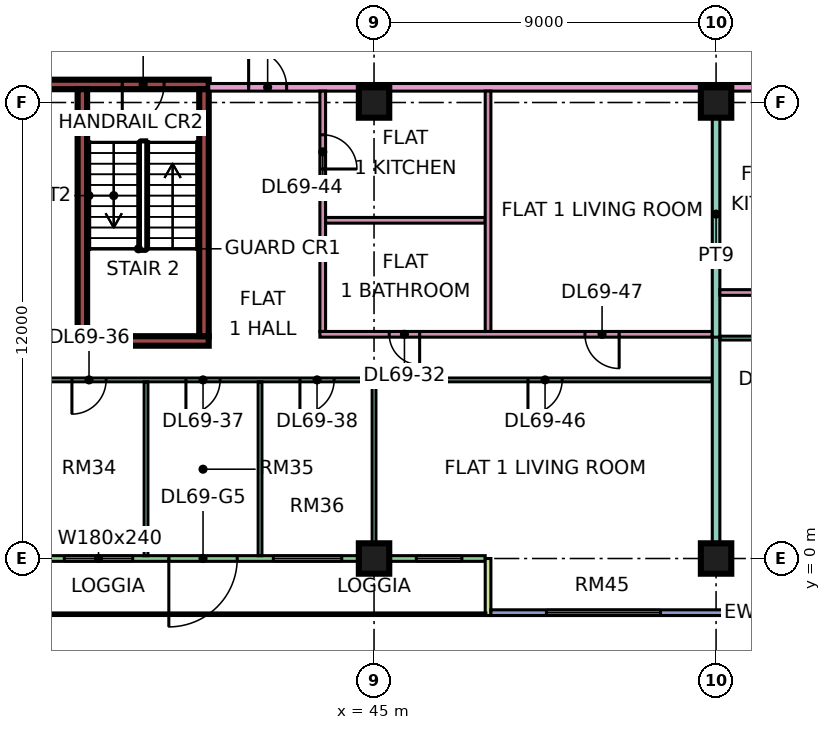
"""IFC4 building model, lengths in metres.
Left out: names, types, materials, properties, quantities, classifications, styles, units other than length and angle.
Written with IfcOpenShell. Run it as: python <this file> out.ifc"""

import sys

from ifc_helpers import new_model, si_unit, direction, frame, frame_2d, origin, origin_2d, place, context, subcontext, project, spatial, rectangle, extrude, element, fill, save


model = new_model("IFC4")
c1 = context("Model", 3, precision=1e-05, world=origin(), true_north=direction((0.0, 1.0)))
c2 = subcontext(c1, "Body", "Model", "MODEL_VIEW")
j1 = project(units=[si_unit("LENGTHUNIT", "METRE"), si_unit("PLANEANGLEUNIT", "RADIAN")], contexts=[c1])
p1 = place(None, origin())
s1 = spatial("IfcSite", under=j1, at=p1, CompositionType="ELEMENT")
p2 = place(p1, origin())
s2 = spatial("IfcBuilding", under=s1, at=p2, CompositionType="ELEMENT")
p3 = place(p2, frame((0.0, 0.0, 295.9)))
s3 = spatial("IfcBuildingStorey", under=s2, at=p3, CompositionType="ELEMENT", Elevation=295.9)
for number, where, z_axis, x_axis in (
    (1, (45.0, 0.0, 0.0), (0.0, 0.0, 1.0), (1.0, 0.0, 0.0)),
    (2, (45.0, 12.0, 0.0), (0.0, 0.0, 1.0), (1.0, 0.0, 0.0)),
    (3, (54.0, 0.0, 0.0), (0.0, 0.0, 1.0), (1.0, 0.0, 0.0)),
    (4, (54.0, 12.0, 0.0), (0.0, 0.0, 1.0), (1.0, 0.0, 0.0)),
):
    element("IfcColumn", number, at=place(p3, frame(where, z_axis=z_axis, x_axis=x_axis)), inside=s3, PredefinedType="COLUMN", context=c2, shape_type="SweptSolid", body=[
        extrude(rectangle(XDim=0.8, YDim=0.8, at=origin_2d()), origin(), (0.0, 0.0, 1.0), 3.75),
    ])
p4 = place(p3, frame((37.2, 5.725, 0.0), z_axis=(0.0, 0.0, 1.0), x_axis=(1.0, 0.0, 0.0)))
e5 = element("IfcWall", 5, at=p4, inside=s3, PredefinedType="SHEAR", context=c2, shape_type="SweptSolid", body=[
    extrude(rectangle(XDim=3.45, YDim=0.25, at=frame_2d((1.725, 0.0))), origin(), (0.0, 0.0, 1.0), 3.75),
])
p5 = place(p3, frame((36.4, 12.475, 0.0), z_axis=(0.0, 0.0, 1.0), x_axis=(1.0, 0.0, 0.0)))
e6 = element("IfcWall", 6, at=p5, inside=s3, PredefinedType="SHEAR", context=c2, shape_type="SweptSolid", body=[
    extrude(rectangle(XDim=4.25, YDim=0.25, at=frame_2d((2.125, 0.0))), origin(), (0.0, 0.0, 1.0), 3.75),
])
p6 = place(p5, frame((1.975, 0.0, 0.0)))
e7 = element("IfcOpeningElement", 7, at=p6, cuts=e6, PredefinedType="OPENING", context=c2, shape_type="SweptSolid", body=[
    extrude(rectangle(XDim=1.1, YDim=2.2, at=frame_2d((0.55, 1.1))), frame((0.0, 0.135, 0.0), z_axis=(0.0, -1.0, 0.0), x_axis=(1.0, 0.0, 0.0)), (0.0, 0.0, 1.0), 0.27),
])
for number, where, z_axis, x_axis in (
    (8, (37.325, 5.85, 0.0), (0.0, 0.0, 1.0), (0.0, 1.0, 0.0)),
    (9, (40.525, 5.85, 0.0), (0.0, 0.0, 1.0), (0.0, 1.0, 0.0)),
):
    element("IfcWall", number, at=place(p3, frame(where, z_axis=z_axis, x_axis=x_axis)), inside=s3, PredefinedType="SHEAR", context=c2, shape_type="SweptSolid", body=[
        extrude(rectangle(XDim=6.5, YDim=0.25, at=frame_2d((3.25, 0.0))), origin(), (0.0, 0.0, 1.0), 3.75),
    ])
p7 = place(p3, frame((36.075, 0.0, 0.0), z_axis=(0.0, 0.0, 1.0), x_axis=(1.0, 0.0, 0.0)))
e10 = element("IfcWall", 10, at=p7, inside=s3, PredefinedType="SOLIDWALL", context=c2, shape_type="SweptSolid", body=[
    extrude(rectangle(XDim=11.85, YDim=0.15, at=frame_2d((5.925, 0.0))), origin(), (0.0, 0.0, 1.0), 3.35),
])
p8 = place(p7, frame((0.775, 0.0, 0.45)))
e11 = element("IfcOpeningElement", 11, at=p8, cuts=e10, PredefinedType="OPENING", context=c2, shape_type="SweptSolid", body=[
    extrude(rectangle(XDim=1.8, YDim=2.4, at=frame_2d((0.9, 1.2))), frame((0.0, 0.085, 0.0), z_axis=(0.0, -1.0, 0.0), x_axis=(1.0, 0.0, 0.0)), (0.0, 0.0, 1.0), 0.17),
])
p9 = place(p7, frame((3.525, 0.0, 0.0)))
e12 = element("IfcOpeningElement", 12, at=p9, cuts=e10, PredefinedType="OPENING", context=c2, shape_type="SweptSolid", body=[
    extrude(rectangle(XDim=1.8, YDim=2.4, at=frame_2d((0.9, 1.2))), frame((0.0, 0.085, 0.0), z_axis=(0.0, -1.0, 0.0), x_axis=(1.0, 0.0, 0.0)), (0.0, 0.0, 1.0), 0.17),
])
p10 = place(p7, frame((6.275, 0.0, 0.45)))
e13 = element("IfcOpeningElement", 13, at=p10, cuts=e10, PredefinedType="OPENING", context=c2, shape_type="SweptSolid", body=[
    extrude(rectangle(XDim=1.8, YDim=2.4, at=frame_2d((0.9, 1.2))), frame((0.0, 0.085, 0.0), z_axis=(0.0, -1.0, 0.0), x_axis=(1.0, 0.0, 0.0)), (0.0, 0.0, 1.0), 0.17),
])
p11 = place(p7, frame((10.038, 0.0, 0.45)))
e14 = element("IfcOpeningElement", 14, at=p11, cuts=e10, PredefinedType="OPENING", context=c2, shape_type="SweptSolid", body=[
    extrude(rectangle(XDim=1.2, YDim=2.4, at=frame_2d((0.6, 1.2))), frame((0.0, 0.085, 0.0), z_axis=(0.0, -1.0, 0.0), x_axis=(1.0, 0.0, 0.0)), (0.0, 0.0, 1.0), 0.17),
])
p12 = place(p3, frame((48.0, -1.5, 0.0), z_axis=(0.0, 0.0, 1.0), x_axis=(0.0, 1.0, 0.0)))
e15 = element("IfcWall", 15, at=p12, inside=s3, PredefinedType="SOLIDWALL", context=c2, shape_type="SweptSolid", body=[
    extrude(rectangle(XDim=1.5, YDim=0.15, at=frame_2d((0.75, 0.0))), origin(), (0.0, 0.0, 1.0), 3.35),
])
p13 = place(p3, frame((48.075, -1.425, 0.0), z_axis=(0.0, 0.0, 1.0), x_axis=(1.0, 0.0, 0.0)))
e16 = element("IfcWall", 16, at=p13, inside=s3, PredefinedType="SOLIDWALL", context=c2, shape_type="SweptSolid", body=[
    extrude(rectangle(XDim=13.425, YDim=0.15, at=frame_2d((6.712, 0.0))), origin(), (0.0, 0.0, 1.0), 3.35),
])
p14 = place(p13, frame((1.462, 0.0, 0.45)))
e17 = element("IfcOpeningElement", 17, at=p14, cuts=e16, PredefinedType="OPENING", context=c2, shape_type="SweptSolid", body=[
    extrude(rectangle(XDim=3.0, YDim=2.4, at=frame_2d((1.5, 1.2))), frame((0.0, 0.085, 0.0), z_axis=(0.0, -1.0, 0.0), x_axis=(1.0, 0.0, 0.0)), (0.0, 0.0, 1.0), 0.17),
])
p15 = place(p13, frame((6.525, 0.0, 0.45)))
e18 = element("IfcOpeningElement", 18, at=p15, cuts=e16, PredefinedType="OPENING", context=c2, shape_type="SweptSolid", body=[
    extrude(rectangle(XDim=1.8, YDim=2.4, at=frame_2d((0.9, 1.2))), frame((0.0, 0.085, 0.0), z_axis=(0.0, -1.0, 0.0), x_axis=(1.0, 0.0, 0.0)), (0.0, 0.0, 1.0), 0.17),
])
p16 = place(p13, frame((9.675, 0.0, 0.45)))
e19 = element("IfcOpeningElement", 19, at=p16, cuts=e16, PredefinedType="OPENING", context=c2, shape_type="SweptSolid", body=[
    extrude(rectangle(XDim=3.0, YDim=2.4, at=frame_2d((1.5, 1.2))), frame((0.0, 0.085, 0.0), z_axis=(0.0, -1.0, 0.0), x_axis=(1.0, 0.0, 0.0)), (0.0, 0.0, 1.0), 0.17),
])
p17 = place(p3, frame((33.05, 4.7, 0.0), z_axis=(0.0, 0.0, 1.0), x_axis=(1.0, 0.0, 0.0)))
e20 = element("IfcWall", 20, at=p17, inside=s3, PredefinedType="PARTITIONING", context=c2, shape_type="SweptSolid", body=[
    extrude(rectangle(XDim=20.85, YDim=0.1, at=frame_2d((10.425, 0.0))), origin(), (0.0, 0.0, 1.0), 3.35),
])
p18 = place(p17, frame((1.0, 0.0, 0.0)))
e21 = element("IfcOpeningElement", 21, at=p18, cuts=e20, PredefinedType="OPENING", context=c2, shape_type="SweptSolid", body=[
    extrude(rectangle(XDim=0.9, YDim=2.1, at=frame_2d((0.45, 1.05))), frame((0.0, 0.06, 0.0), z_axis=(0.0, -1.0, 0.0), x_axis=(1.0, 0.0, 0.0)), (0.0, 0.0, 1.0), 0.12),
])
p19 = place(p17, frame((4.0, 0.0, 0.0)))
e22 = element("IfcOpeningElement", 22, at=p19, cuts=e20, PredefinedType="OPENING", context=c2, shape_type="SweptSolid", body=[
    extrude(rectangle(XDim=0.9, YDim=2.1, at=frame_2d((0.45, 1.05))), frame((0.0, 0.06, 0.0), z_axis=(0.0, -1.0, 0.0), x_axis=(1.0, 0.0, 0.0)), (0.0, 0.0, 1.0), 0.12),
])
p20 = place(p17, frame((7.0, 0.0, 0.0)))
e23 = element("IfcOpeningElement", 23, at=p20, cuts=e20, PredefinedType="OPENING", context=c2, shape_type="SweptSolid", body=[
    extrude(rectangle(XDim=0.9, YDim=2.1, at=frame_2d((0.45, 1.05))), frame((0.0, 0.06, 0.0), z_axis=(0.0, -1.0, 0.0), x_axis=(1.0, 0.0, 0.0)), (0.0, 0.0, 1.0), 0.12),
])
p21 = place(p17, frame((10.0, 0.0, 0.0)))
e24 = element("IfcOpeningElement", 24, at=p21, cuts=e20, PredefinedType="OPENING", context=c2, shape_type="SweptSolid", body=[
    extrude(rectangle(XDim=0.9, YDim=2.1, at=frame_2d((0.45, 1.05))), frame((0.0, 0.06, 0.0), z_axis=(0.0, -1.0, 0.0), x_axis=(1.0, 0.0, 0.0)), (0.0, 0.0, 1.0), 0.12),
])
p22 = place(p17, frame((16.0, 0.0, 0.0)))
e25 = element("IfcOpeningElement", 25, at=p22, cuts=e20, PredefinedType="OPENING", context=c2, shape_type="SweptSolid", body=[
    extrude(rectangle(XDim=0.9, YDim=2.1, at=frame_2d((0.45, 1.05))), frame((0.0, 0.06, 0.0), z_axis=(0.0, -1.0, 0.0), x_axis=(1.0, 0.0, 0.0)), (0.0, 0.0, 1.0), 0.12),
])
p23 = place(p3, frame((39.0, 0.074, 0.0), z_axis=(0.0, 0.0, 1.0), x_axis=(0.0, 1.0, 0.0)))
e26 = element("IfcWall", 26, at=p23, inside=s3, PredefinedType="PARTITIONING", context=c2, shape_type="SweptSolid", body=[
    extrude(rectangle(XDim=4.576, YDim=0.1, at=frame_2d((2.288, 0.0))), origin(), (0.0, 0.0, 1.0), 3.35),
])
p24 = place(p3, frame((40.65, 12.4, 0.0), z_axis=(0.0, 0.0, 1.0), x_axis=(1.0, 0.0, 0.0)))
e27 = element("IfcWall", 27, at=p24, inside=s3, PredefinedType="PARTITIONING", context=c2, shape_type="SweptSolid", body=[
    extrude(rectangle(XDim=22.276, YDim=0.2, at=frame_2d((11.138, 0.0))), origin(), (0.0, 0.0, 1.0), 3.35),
])
p25 = place(p24, frame((20.25, 0.0, 0.0)))
e28 = element("IfcOpeningElement", 28, at=p25, cuts=e27, PredefinedType="OPENING", context=c2, shape_type="SweptSolid", body=[
    extrude(rectangle(XDim=1.0, YDim=2.1, at=frame_2d((0.5, 1.05))), frame((0.0, 0.11, 0.0), z_axis=(0.0, -1.0, 0.0), x_axis=(1.0, 0.0, 0.0)), (0.0, 0.0, 1.0), 0.22),
])
p26 = place(p24, frame((1.05, 0.0, 0.0)))
e29 = element("IfcOpeningElement", 29, at=p26, cuts=e27, PredefinedType="OPENING", context=c2, shape_type="SweptSolid", body=[
    extrude(rectangle(XDim=1.0, YDim=2.1, at=frame_2d((0.5, 1.05))), frame((0.0, 0.11, 0.0), z_axis=(0.0, -1.0, 0.0), x_axis=(1.0, 0.0, 0.0)), (0.0, 0.0, 1.0), 0.22),
])
p27 = place(p3, frame((42.0, 0.074, 0.0), z_axis=(0.0, 0.0, 1.0), x_axis=(0.0, 1.0, 0.0)))
e30 = element("IfcWall", 30, at=p27, inside=s3, PredefinedType="PARTITIONING", context=c2, shape_type="SweptSolid", body=[
    extrude(rectangle(XDim=4.576, YDim=0.1, at=frame_2d((2.288, 0.0))), origin(), (0.0, 0.0, 1.0), 3.35),
])
p28 = place(p3, frame((43.575, 5.9, 0.0), z_axis=(0.0, 0.0, 1.0), x_axis=(1.0, 0.0, 0.0)))
e31 = element("IfcWall", 31, at=p28, inside=s3, PredefinedType="PARTITIONING", context=c2, shape_type="SweptSolid", body=[
    extrude(rectangle(XDim=10.325, YDim=0.15, at=frame_2d((5.163, 0.0))), origin(), (0.0, 0.0, 1.0), 3.35),
])
p29 = place(p28, frame((1.825, 0.0, 0.0)))
e32 = element("IfcOpeningElement", 32, at=p29, cuts=e31, PredefinedType="OPENING", context=c2, shape_type="SweptSolid", body=[
    extrude(rectangle(XDim=0.8, YDim=2.1, at=frame_2d((0.4, 1.05))), frame((0.0, 0.085, 0.0), z_axis=(0.0, -1.0, 0.0), x_axis=(1.0, 0.0, 0.0)), (0.0, 0.0, 1.0), 0.17),
])
p30 = place(p28, frame((6.975, 0.0, 0.0)))
e33 = element("IfcOpeningElement", 33, at=p30, cuts=e31, PredefinedType="OPENING", context=c2, shape_type="SweptSolid", body=[
    extrude(rectangle(XDim=0.9, YDim=2.1, at=frame_2d((0.45, 1.05))), frame((0.0, 0.085, 0.0), z_axis=(0.0, -1.0, 0.0), x_axis=(1.0, 0.0, 0.0)), (0.0, 0.0, 1.0), 0.17),
])
p31 = place(p3, frame((43.65, 5.975, 0.0), z_axis=(0.0, 0.0, 1.0), x_axis=(0.0, 1.0, 0.0)))
e34 = element("IfcWall", 34, at=p31, inside=s3, PredefinedType="PARTITIONING", context=c2, shape_type="SweptSolid", body=[
    extrude(rectangle(XDim=6.325, YDim=0.15, at=frame_2d((3.163, 0.0))), origin(), (0.0, 0.0, 1.0), 3.35),
])
p32 = place(p31, frame((4.275, 0.0, 0.0)))
e35 = element("IfcOpeningElement", 35, at=p32, cuts=e34, PredefinedType="OPENING", context=c2, shape_type="SweptSolid", body=[
    extrude(rectangle(XDim=0.9, YDim=2.1, at=frame_2d((0.45, 1.05))), frame((0.0, 0.085, 0.0), z_axis=(0.0, -1.0, 0.0), x_axis=(1.0, 0.0, 0.0)), (0.0, 0.0, 1.0), 0.17),
])
p33 = place(p3, frame((43.725, 8.9, 0.0), z_axis=(0.0, 0.0, 1.0), x_axis=(1.0, 0.0, 0.0)))
e36 = element("IfcWall", 36, at=p33, inside=s3, PredefinedType="PARTITIONING", context=c2, shape_type="SweptSolid", body=[
    extrude(rectangle(XDim=4.2, YDim=0.15, at=frame_2d((2.1, 0.0))), origin(), (0.0, 0.0, 1.0), 3.35),
])
p34 = place(p3, frame((45.0, 0.074, 0.0), z_axis=(0.0, 0.0, 1.0), x_axis=(0.0, 1.0, 0.0)))
e37 = element("IfcWall", 37, at=p34, inside=s3, PredefinedType="PARTITIONING", context=c2, shape_type="SweptSolid", body=[
    extrude(rectangle(XDim=4.576, YDim=0.1, at=frame_2d((2.288, 0.0))), origin(), (0.0, 0.0, 1.0), 3.35),
])
p35 = place(p3, frame((48.0, 5.975, 0.0), z_axis=(0.0, 0.0, 1.0), x_axis=(0.0, 1.0, 0.0)))
e38 = element("IfcWall", 38, at=p35, inside=s3, PredefinedType="PARTITIONING", context=c2, shape_type="SweptSolid", body=[
    extrude(rectangle(XDim=6.325, YDim=0.15, at=frame_2d((3.163, 0.0))), origin(), (0.0, 0.0, 1.0), 3.35),
])
p36 = place(p3, frame((54.0, 0.0, 0.0), z_axis=(0.0, 0.0, 1.0), x_axis=(0.0, 1.0, 0.0)))
e39 = element("IfcWall", 39, at=p36, inside=s3, PredefinedType="PARTITIONING", context=c2, shape_type="SweptSolid", body=[
    extrude(rectangle(XDim=5.85, YDim=0.2, at=frame_2d((2.925, 0.0))), origin(), (0.0, 0.0, 1.0), 3.35),
])
p37 = place(p3, frame((54.0, 5.825, 0.0), z_axis=(0.0, 0.0, 1.0), x_axis=(0.0, 1.0, 0.0)))
e40 = element("IfcWall", 40, at=p37, inside=s3, PredefinedType="PARTITIONING", context=c2, shape_type="SweptSolid", body=[
    extrude(rectangle(XDim=6.475, YDim=0.2, at=frame_2d((3.238, 0.0))), origin(), (0.0, 0.0, 1.0), 3.35),
])
p38 = place(p3, frame((54.1, 5.8, 0.0), z_axis=(0.0, 0.0, 1.0), x_axis=(1.0, 0.0, 0.0)))
e41 = element("IfcWall", 41, at=p38, inside=s3, PredefinedType="PARTITIONING", context=c2, shape_type="SweptSolid", body=[
    extrude(rectangle(XDim=2.85, YDim=0.1, at=frame_2d((1.425, 0.0))), origin(), (0.0, 0.0, 1.0), 3.35),
])
p39 = place(p38, frame((0.95, 0.0, 0.0)))
e42 = element("IfcOpeningElement", 42, at=p39, cuts=e41, PredefinedType="OPENING", context=c2, shape_type="SweptSolid", body=[
    extrude(rectangle(XDim=0.9, YDim=2.1, at=frame_2d((0.45, 1.05))), frame((0.0, 0.06, 0.0), z_axis=(0.0, -1.0, 0.0), x_axis=(1.0, 0.0, 0.0)), (0.0, 0.0, 1.0), 0.12),
])
p40 = place(p3, frame((54.1, 7.0, 0.0), z_axis=(0.0, 0.0, 1.0), x_axis=(1.0, 0.0, 0.0)))
e43 = element("IfcWall", 43, at=p40, inside=s3, PredefinedType="PARTITIONING", context=c2, shape_type="SweptSolid", body=[
    extrude(rectangle(XDim=5.675, YDim=0.15, at=frame_2d((2.837, 0.0))), origin(), (0.0, 0.0, 1.0), 3.35),
])
p41 = place(p40, frame((0.95, 0.0, 0.0)))
e44 = element("IfcOpeningElement", 44, at=p41, cuts=e43, PredefinedType="OPENING", context=c2, shape_type="SweptSolid", body=[
    extrude(rectangle(XDim=0.9, YDim=2.1, at=frame_2d((0.45, 1.05))), frame((0.0, 0.085, 0.0), z_axis=(0.0, -1.0, 0.0), x_axis=(1.0, 0.0, 0.0)), (0.0, 0.0, 1.0), 0.17),
])
p42 = place(p8, origin())
e45 = element("IfcWindow", 45, at=p42, inside=s3, PartitioningType="SINGLE_PANEL", PredefinedType="WINDOW", context=c2, shape_type="SweptSolid", body=[
    extrude(rectangle(XDim=1.8, YDim=2.4, at=frame_2d((0.9, 1.2))), frame((0.0, 0.03, 0.0), z_axis=(0.0, -1.0, 0.0), x_axis=(1.0, 0.0, 0.0)), (0.0, 0.0, 1.0), 0.06),
])
fill(e11, e45)
p43 = place(p9, frame((1.8, 0.0, 0.0), z_axis=(0.0, 0.0, 1.0), x_axis=(-1.0, 0.0, 0.0)))
e46 = element("IfcDoor", 46, at=p43, inside=s3, OperationType="DOUBLE_DOOR_SINGLE_SWING", PredefinedType="DOOR", context=c2, shape_type="SweptSolid", body=[
    extrude(rectangle(XDim=1.8, YDim=2.4, at=frame_2d((0.9, 1.2))), frame((0.0, 0.025, 0.0), z_axis=(0.0, -1.0, 0.0), x_axis=(1.0, 0.0, 0.0)), (0.0, 0.0, 1.0), 0.05),
])
fill(e12, e46)
p44 = place(p10, origin())
e47 = element("IfcWindow", 47, at=p44, inside=s3, PartitioningType="SINGLE_PANEL", PredefinedType="WINDOW", context=c2, shape_type="SweptSolid", body=[
    extrude(rectangle(XDim=1.8, YDim=2.4, at=frame_2d((0.9, 1.2))), frame((0.0, 0.03, 0.0), z_axis=(0.0, -1.0, 0.0), x_axis=(1.0, 0.0, 0.0)), (0.0, 0.0, 1.0), 0.06),
])
fill(e13, e47)
p45 = place(p11, origin())
e48 = element("IfcWindow", 48, at=p45, inside=s3, PartitioningType="SINGLE_PANEL", PredefinedType="WINDOW", context=c2, shape_type="SweptSolid", body=[
    extrude(rectangle(XDim=1.2, YDim=2.4, at=frame_2d((0.6, 1.2))), frame((0.0, 0.03, 0.0), z_axis=(0.0, -1.0, 0.0), x_axis=(1.0, 0.0, 0.0)), (0.0, 0.0, 1.0), 0.06),
])
fill(e14, e48)
p46 = place(p14, origin())
e49 = element("IfcWindow", 49, at=p46, inside=s3, PartitioningType="SINGLE_PANEL", PredefinedType="WINDOW", context=c2, shape_type="SweptSolid", body=[
    extrude(rectangle(XDim=3.0, YDim=2.4, at=frame_2d((1.5, 1.2))), frame((0.0, 0.03, 0.0), z_axis=(0.0, -1.0, 0.0), x_axis=(1.0, 0.0, 0.0)), (0.0, 0.0, 1.0), 0.06),
])
fill(e17, e49)
p47 = place(p15, origin())
e50 = element("IfcWindow", 50, at=p47, inside=s3, PartitioningType="SINGLE_PANEL", PredefinedType="WINDOW", context=c2, shape_type="SweptSolid", body=[
    extrude(rectangle(XDim=1.8, YDim=2.4, at=frame_2d((0.9, 1.2))), frame((0.0, 0.03, 0.0), z_axis=(0.0, -1.0, 0.0), x_axis=(1.0, 0.0, 0.0)), (0.0, 0.0, 1.0), 0.06),
])
fill(e18, e50)
p48 = place(p6, frame((1.1, 0.0, 0.0), z_axis=(0.0, 0.0, 1.0), x_axis=(-1.0, 0.0, 0.0)))
e51 = element("IfcDoor", 51, at=p48, inside=s3, OperationType="SINGLE_SWING_LEFT", PredefinedType="DOOR", context=c2, shape_type="SweptSolid", body=[
    extrude(rectangle(XDim=1.1, YDim=2.2, at=frame_2d((0.55, 1.1))), frame((0.0, 0.025, 0.0), z_axis=(0.0, -1.0, 0.0), x_axis=(1.0, 0.0, 0.0)), (0.0, 0.0, 1.0), 0.05),
])
fill(e7, e51)
p49 = place(p29, origin())
e52 = element("IfcDoor", 52, at=p49, inside=s3, OperationType="SINGLE_SWING_RIGHT", PredefinedType="DOOR", context=c2, shape_type="SweptSolid", body=[
    extrude(rectangle(XDim=0.8, YDim=2.1, at=frame_2d((0.4, 1.05))), frame((0.0, 0.025, 0.0), z_axis=(0.0, -1.0, 0.0), x_axis=(1.0, 0.0, 0.0)), (0.0, 0.0, 1.0), 0.05),
])
fill(e32, e52)
p50 = place(p19, frame((0.9, 0.0, 0.0), z_axis=(0.0, 0.0, 1.0), x_axis=(-1.0, 0.0, 0.0)))
e53 = element("IfcDoor", 53, at=p50, inside=s3, OperationType="SINGLE_SWING_LEFT", PredefinedType="DOOR", context=c2, shape_type="SweptSolid", body=[
    extrude(rectangle(XDim=0.9, YDim=2.1, at=frame_2d((0.45, 1.05))), frame((0.0, 0.025, 0.0), z_axis=(0.0, -1.0, 0.0), x_axis=(1.0, 0.0, 0.0)), (0.0, 0.0, 1.0), 0.05),
])
fill(e22, e53)
p51 = place(p20, frame((0.9, 0.0, 0.0), z_axis=(0.0, 0.0, 1.0), x_axis=(-1.0, 0.0, 0.0)))
e54 = element("IfcDoor", 54, at=p51, inside=s3, OperationType="SINGLE_SWING_LEFT", PredefinedType="DOOR", context=c2, shape_type="SweptSolid", body=[
    extrude(rectangle(XDim=0.9, YDim=2.1, at=frame_2d((0.45, 1.05))), frame((0.0, 0.025, 0.0), z_axis=(0.0, -1.0, 0.0), x_axis=(1.0, 0.0, 0.0)), (0.0, 0.0, 1.0), 0.05),
])
fill(e23, e54)
p52 = place(p21, frame((0.9, 0.0, 0.0), z_axis=(0.0, 0.0, 1.0), x_axis=(-1.0, 0.0, 0.0)))
e55 = element("IfcDoor", 55, at=p52, inside=s3, OperationType="SINGLE_SWING_LEFT", PredefinedType="DOOR", context=c2, shape_type="SweptSolid", body=[
    extrude(rectangle(XDim=0.9, YDim=2.1, at=frame_2d((0.45, 1.05))), frame((0.0, 0.025, 0.0), z_axis=(0.0, -1.0, 0.0), x_axis=(1.0, 0.0, 0.0)), (0.0, 0.0, 1.0), 0.05),
])
fill(e24, e55)
p53 = place(p26, origin())
e56 = element("IfcDoor", 56, at=p53, inside=s3, OperationType="SINGLE_SWING_LEFT", PredefinedType="DOOR", context=c2, shape_type="SweptSolid", body=[
    extrude(rectangle(XDim=1.0, YDim=2.1, at=frame_2d((0.5, 1.05))), frame((0.0, 0.025, 0.0), z_axis=(0.0, -1.0, 0.0), x_axis=(1.0, 0.0, 0.0)), (0.0, 0.0, 1.0), 0.05),
])
fill(e29, e56)
p54 = place(p32, frame((0.9, 0.0, 0.0), z_axis=(0.0, 0.0, 1.0), x_axis=(-1.0, 0.0, 0.0)))
e57 = element("IfcDoor", 57, at=p54, inside=s3, OperationType="SINGLE_SWING_LEFT", PredefinedType="DOOR", context=c2, shape_type="SweptSolid", body=[
    extrude(rectangle(XDim=0.9, YDim=2.1, at=frame_2d((0.45, 1.05))), frame((0.0, 0.025, 0.0), z_axis=(0.0, -1.0, 0.0), x_axis=(1.0, 0.0, 0.0)), (0.0, 0.0, 1.0), 0.05),
])
fill(e35, e57)
p55 = place(p22, frame((0.9, 0.0, 0.0), z_axis=(0.0, 0.0, 1.0), x_axis=(-1.0, 0.0, 0.0)))
e58 = element("IfcDoor", 58, at=p55, inside=s3, OperationType="SINGLE_SWING_LEFT", PredefinedType="DOOR", context=c2, shape_type="SweptSolid", body=[
    extrude(rectangle(XDim=0.9, YDim=2.1, at=frame_2d((0.45, 1.05))), frame((0.0, 0.025, 0.0), z_axis=(0.0, -1.0, 0.0), x_axis=(1.0, 0.0, 0.0)), (0.0, 0.0, 1.0), 0.05),
])
fill(e25, e58)
p56 = place(p30, origin())
e59 = element("IfcDoor", 59, at=p56, inside=s3, OperationType="SINGLE_SWING_RIGHT", PredefinedType="DOOR", context=c2, shape_type="SweptSolid", body=[
    extrude(rectangle(XDim=0.9, YDim=2.1, at=frame_2d((0.45, 1.05))), frame((0.0, 0.025, 0.0), z_axis=(0.0, -1.0, 0.0), x_axis=(1.0, 0.0, 0.0)), (0.0, 0.0, 1.0), 0.05),
])
fill(e33, e59)
save(model, sys.argv[1])
